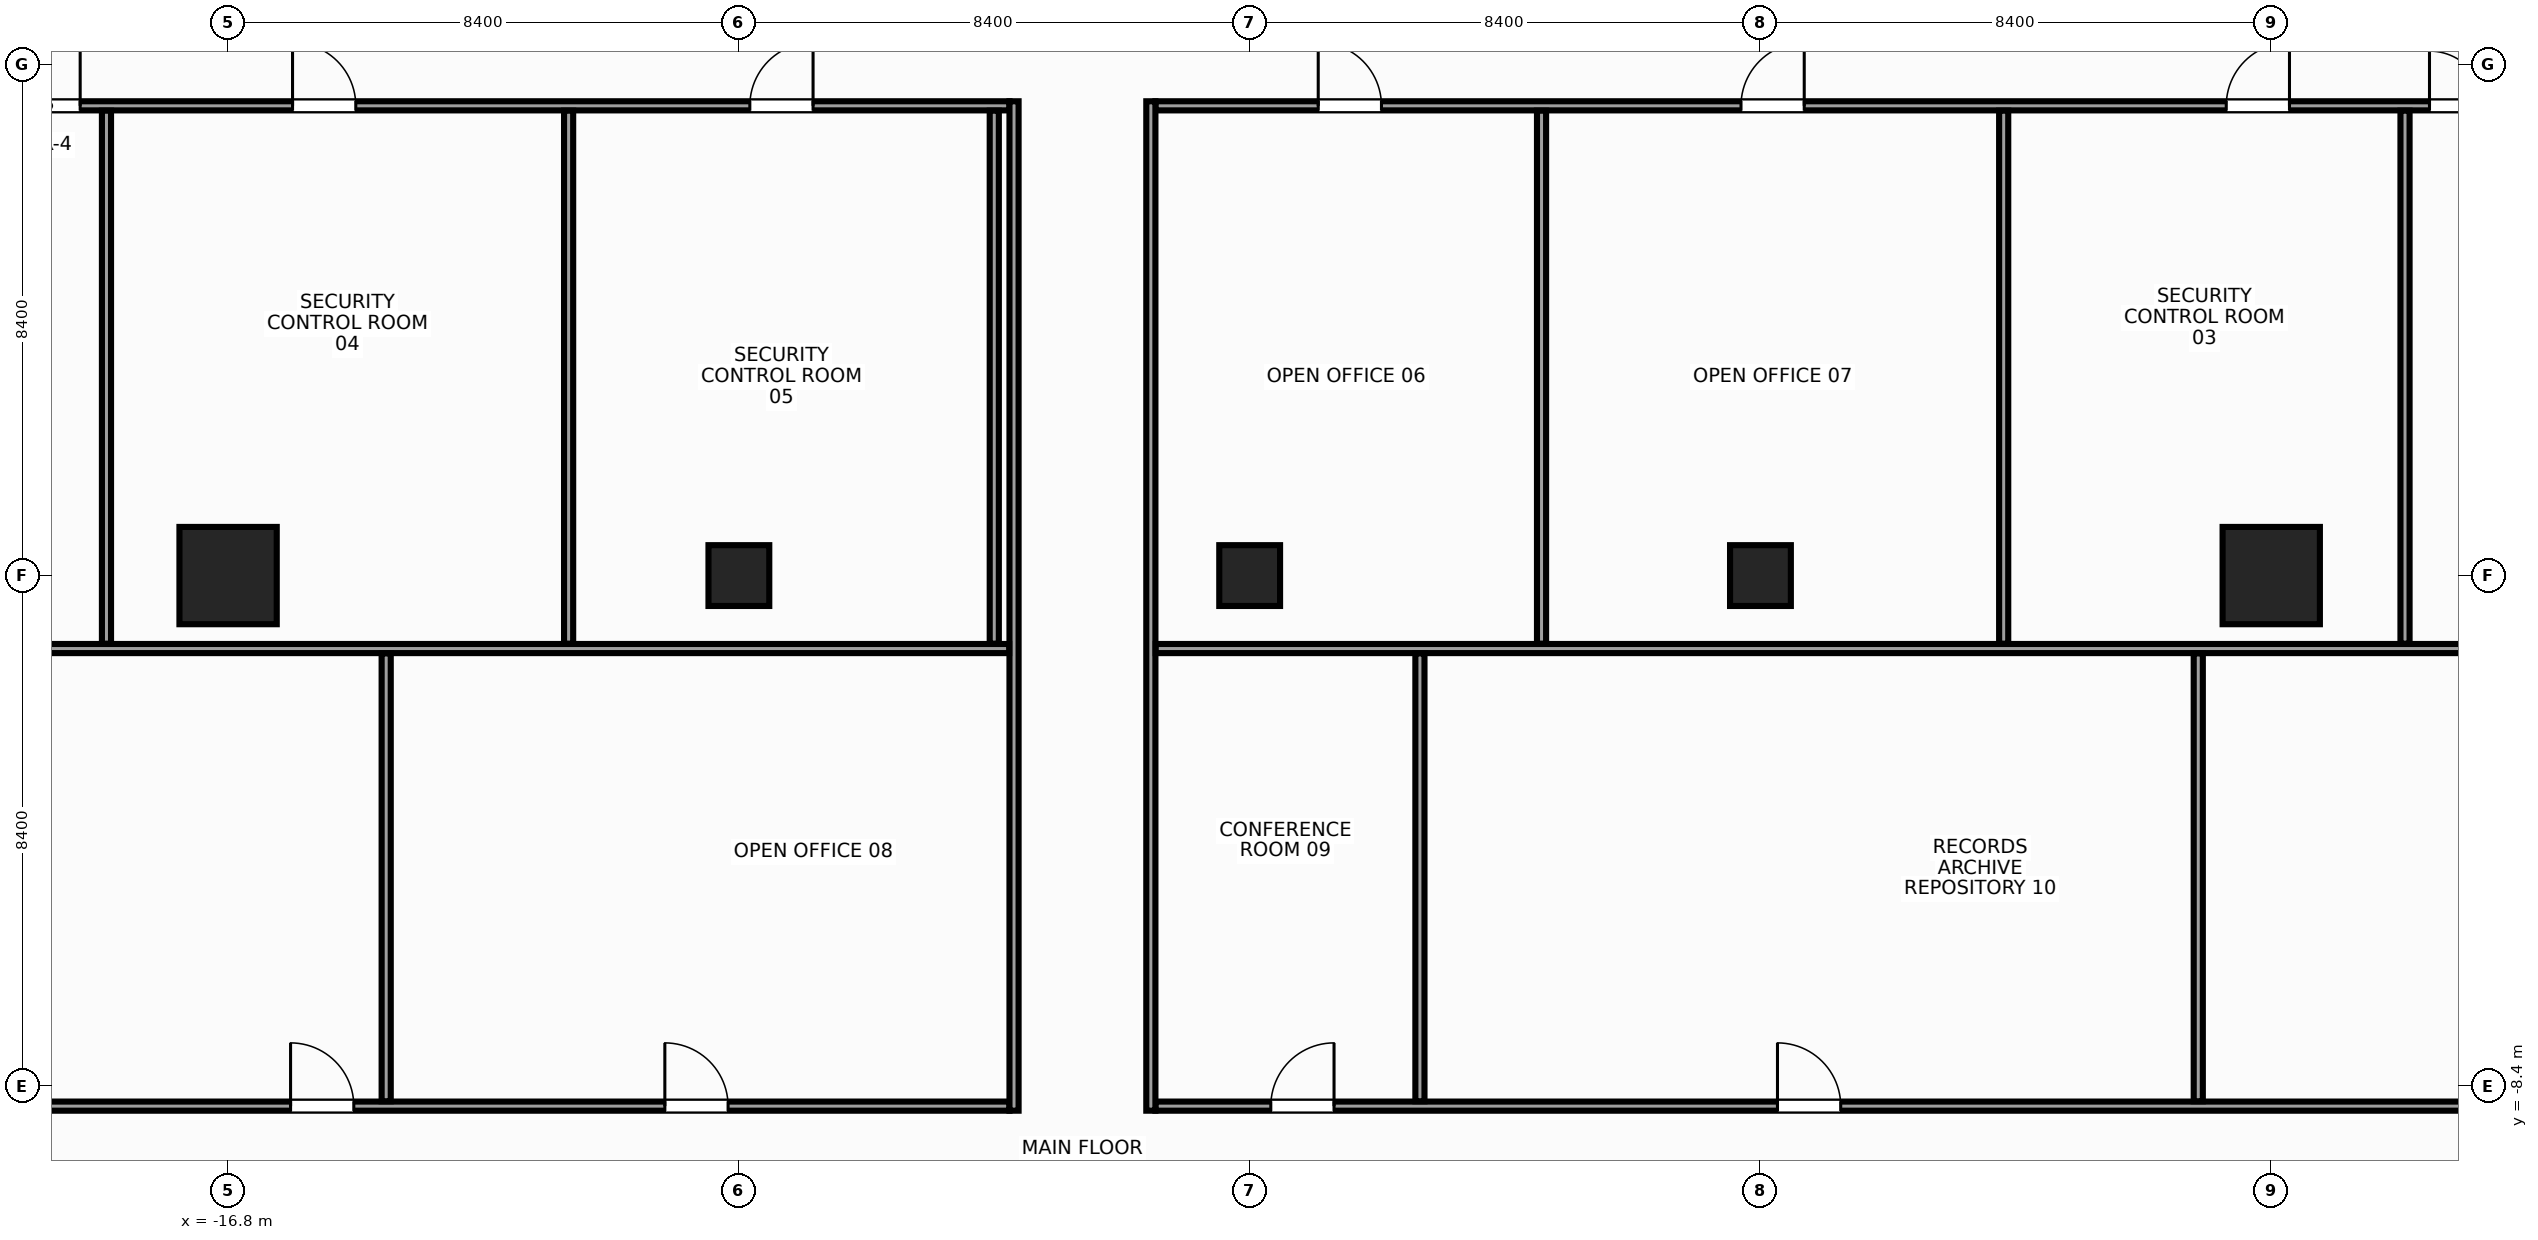
"""IFC4 building model, lengths in metres.
Left out: names, types, materials, properties, quantities, classifications, styles, units other than length and angle.
Written with IfcOpenShell. Run it as: python <this file> out.ifc"""

import sys

from ifc_helpers import new_model, si_unit, direction, frame, frame_2d, origin, origin_with_axes, origin_2d, place, context, subcontext, project, spatial, rectangle, hollow_rectangle, extrude, source, transform, mapped, element, fill, save


model = new_model("IFC4")
c1 = context("Model", 3, precision=1e-05, world=origin(), true_north=direction((0.0, 1.0)))
c2 = subcontext(c1, "Body", "Model", "MODEL_VIEW")
j1 = project(units=[si_unit("LENGTHUNIT", "METRE"), si_unit("PLANEANGLEUNIT", "RADIAN")], contexts=[c1])
p1 = place(None, origin())
s1 = spatial("IfcSite", under=j1, at=p1, CompositionType="ELEMENT")
p2 = place(p1, origin())
s2 = spatial("IfcBuilding", under=s1, at=p2, CompositionType="ELEMENT")
p3 = place(p2, frame((0.0, 0.0, 95.6)))
s3 = spatial("IfcBuildingStorey", under=s2, at=p3, CompositionType="ELEMENT", Elevation=95.6)
m1 = source(origin(), c2, "Body", "SweptSolid", [
    extrude(rectangle(XDim=1.6, YDim=1.6, at=origin_2d()), origin(), (0.0, 0.0, 1.0), 3.6),
])
for number, where, z_axis, x_axis in (
    (1, (-16.8, 0.0, 0.0), (0.0, 0.0, 1.0), (1.0, 0.0, 0.0)),
    (2, (16.8, 0.0, 0.0), (0.0, 0.0, 1.0), (1.0, 0.0, 0.0)),
):
    element("IfcColumn", number, at=place(p3, frame(where, z_axis=z_axis, x_axis=x_axis)), inside=s3, PredefinedType="COLUMN", context=c2, shape_type="MappedRepresentation", body=[
        mapped(m1, transform((0.0, 0.0, 0.0), x_axis=(1.0, 0.0, 0.0), y_axis=(0.0, 1.0, 0.0), z_axis=(0.0, 0.0, 1.0), scale=1.0)),
    ])
m2 = source(origin(), c2, "Body", "SweptSolid", [
    extrude(hollow_rectangle(XDim=1.0, YDim=1.0, WallThickness=0.045, at=origin_2d()), origin(), (0.0, 0.0, 1.0), 3.6),
])
for number, where, z_axis, x_axis in (
    (3, (-8.4, 0.0, 0.0), (0.0, 0.0, 1.0), (1.0, 0.0, 0.0)),
    (4, (8.4, 0.0, 0.0), (0.0, 0.0, 1.0), (1.0, 0.0, 0.0)),
):
    element("IfcColumn", number, at=place(p3, frame(where, z_axis=z_axis, x_axis=x_axis)), inside=s3, PredefinedType="COLUMN", context=c2, shape_type="MappedRepresentation", body=[
        mapped(m2, transform((0.0, 0.0, 0.0), x_axis=(1.0, 0.0, 0.0), y_axis=(0.0, 1.0, 0.0), z_axis=(0.0, 0.0, 1.0), scale=1.0)),
    ])
m3 = source(origin(), c2, "Body", "SweptSolid", [
    extrude(rectangle(XDim=1.0, YDim=1.0, at=origin_2d()), origin(), (0.0, 0.0, 1.0), 3.6),
])
p4 = place(p3, origin_with_axes())
e5 = element("IfcColumn", 5, at=p4, inside=s3, PredefinedType="COLUMN", context=c2, shape_type="MappedRepresentation", body=[
    mapped(m3, transform((0.0, 0.0, 0.0), x_axis=(1.0, 0.0, 0.0), y_axis=(0.0, 1.0, 0.0), z_axis=(0.0, 0.0, 1.0), scale=1.0)),
])
m4 = source(origin(), c2, "Body", "SweptSolid", [
    extrude(rectangle(XDim=16.8, YDim=0.15, at=frame_2d((8.4, 0.0))), origin(), (0.0, 0.0, 1.0), 2.745),
])
p5 = place(p3, frame((-20.75, 7.725, 0.0), z_axis=(0.0, 0.0, 1.0), x_axis=(1.0, 0.0, 0.0)))
e6 = element("IfcWall", 6, at=p5, inside=s3, PredefinedType="PARTITIONING", context=c2, shape_type="MappedRepresentation", body=[
    mapped(m4, transform((0.0, 0.0, 0.0), x_axis=(1.0, 0.0, 0.0), y_axis=(0.0, 1.0, 0.0), z_axis=(0.0, 0.0, 1.0), scale=1.0)),
])
p6 = place(p5, frame((0.478, 0.0, 0.0)))
e7 = element("IfcOpeningElement", 7, at=p6, cuts=e6, PredefinedType="OPENING", context=c2, shape_type="SweptSolid", body=[
    extrude(rectangle(XDim=1.04, YDim=2.2, at=frame_2d((0.52, 1.1))), frame((0.0, 0.087, 0.0), z_axis=(0.0, -1.0, 0.0), x_axis=(1.0, 0.0, 0.0)), (0.0, 0.0, 1.0), 0.174),
])
p7 = place(p5, frame((5.01, 0.0, 0.0)))
e8 = element("IfcOpeningElement", 8, at=p7, cuts=e6, PredefinedType="OPENING", context=c2, shape_type="SweptSolid", body=[
    extrude(rectangle(XDim=1.04, YDim=2.2, at=frame_2d((0.52, 1.1))), frame((0.0, 0.087, 0.0), z_axis=(0.0, -1.0, 0.0), x_axis=(1.0, 0.0, 0.0)), (0.0, 0.0, 1.0), 0.174),
])
p8 = place(p5, frame((12.53, 0.0, 0.0)))
e9 = element("IfcOpeningElement", 9, at=p8, cuts=e6, PredefinedType="OPENING", context=c2, shape_type="SweptSolid", body=[
    extrude(rectangle(XDim=1.04, YDim=2.2, at=frame_2d((0.52, 1.1))), frame((0.0, 0.087, 0.0), z_axis=(0.0, -1.0, 0.0), x_axis=(1.0, 0.0, 0.0)), (0.0, 0.0, 1.0), 0.174),
])
m5 = source(origin(), c2, "Body", "SweptSolid", [
    extrude(rectangle(XDim=22.3, YDim=0.15, at=frame_2d((11.15, 0.0))), origin(), (0.0, 0.0, 1.0), 2.745),
])
p9 = place(p3, frame((-1.55, 7.725, 0.0), z_axis=(0.0, 0.0, 1.0), x_axis=(1.0, 0.0, 0.0)))
e10 = element("IfcWall", 10, at=p9, inside=s3, PredefinedType="PARTITIONING", context=c2, shape_type="MappedRepresentation", body=[
    mapped(m5, transform((0.0, 0.0, 0.0), x_axis=(1.0, 0.0, 0.0), y_axis=(0.0, 1.0, 0.0), z_axis=(0.0, 0.0, 1.0), scale=1.0)),
])
p10 = place(p9, frame((20.952, 0.0, 0.0)))
e11 = element("IfcOpeningElement", 11, at=p10, cuts=e10, PredefinedType="OPENING", context=c2, shape_type="SweptSolid", body=[
    extrude(rectangle(XDim=0.9, YDim=2.15, at=frame_2d((0.45, 1.075))), frame((0.0, 0.087, 0.0), z_axis=(0.0, -1.0, 0.0), x_axis=(1.0, 0.0, 0.0)), (0.0, 0.0, 1.0), 0.174),
])
p11 = place(p9, frame((17.61, 0.0, 0.0)))
e12 = element("IfcOpeningElement", 12, at=p11, cuts=e10, PredefinedType="OPENING", context=c2, shape_type="SweptSolid", body=[
    extrude(rectangle(XDim=1.04, YDim=2.2, at=frame_2d((0.52, 1.1))), frame((0.0, 0.087, 0.0), z_axis=(0.0, -1.0, 0.0), x_axis=(1.0, 0.0, 0.0)), (0.0, 0.0, 1.0), 0.174),
])
p12 = place(p9, frame((2.677, 0.0, 0.0)))
e13 = element("IfcOpeningElement", 13, at=p12, cuts=e10, PredefinedType="OPENING", context=c2, shape_type="SweptSolid", body=[
    extrude(rectangle(XDim=1.04, YDim=2.2, at=frame_2d((0.52, 1.1))), frame((0.0, 0.087, 0.0), z_axis=(0.0, -1.0, 0.0), x_axis=(1.0, 0.0, 0.0)), (0.0, 0.0, 1.0), 0.174),
])
p13 = place(p9, frame((9.63, 0.0, 0.0)))
e14 = element("IfcOpeningElement", 14, at=p13, cuts=e10, PredefinedType="OPENING", context=c2, shape_type="SweptSolid", body=[
    extrude(rectangle(XDim=1.04, YDim=2.2, at=frame_2d((0.52, 1.1))), frame((0.0, 0.087, 0.0), z_axis=(0.0, -1.0, 0.0), x_axis=(1.0, 0.0, 0.0)), (0.0, 0.0, 1.0), 0.174),
])
p14 = place(p3, frame((-20.75, -8.725, 0.0), z_axis=(0.0, 0.0, 1.0), x_axis=(1.0, 0.0, 0.0)))
e15 = element("IfcWall", 15, at=p14, inside=s3, PredefinedType="PARTITIONING", context=c2, shape_type="MappedRepresentation", body=[
    mapped(m4, transform((0.0, 0.0, 0.0), x_axis=(1.0, 0.0, 0.0), y_axis=(0.0, 1.0, 0.0), z_axis=(0.0, 0.0, 1.0), scale=1.0)),
])
p15 = place(p14, frame((11.133, 0.0, 0.0)))
e16 = element("IfcOpeningElement", 16, at=p15, cuts=e15, PredefinedType="OPENING", context=c2, shape_type="SweptSolid", body=[
    extrude(rectangle(XDim=1.04, YDim=2.2, at=frame_2d((0.52, 1.1))), frame((0.0, 0.087, 0.0), z_axis=(0.0, -1.0, 0.0), x_axis=(1.0, 0.0, 0.0)), (0.0, 0.0, 1.0), 0.174),
])
p16 = place(p14, frame((4.978, 0.0, 0.0)))
e17 = element("IfcOpeningElement", 17, at=p16, cuts=e15, PredefinedType="OPENING", context=c2, shape_type="SweptSolid", body=[
    extrude(rectangle(XDim=1.04, YDim=2.2, at=frame_2d((0.52, 1.1))), frame((0.0, 0.087, 0.0), z_axis=(0.0, -1.0, 0.0), x_axis=(1.0, 0.0, 0.0)), (0.0, 0.0, 1.0), 0.174),
])
p17 = place(p3, frame((-1.55, -8.725, 0.0), z_axis=(0.0, 0.0, 1.0), x_axis=(1.0, 0.0, 0.0)))
e18 = element("IfcWall", 18, at=p17, inside=s3, PredefinedType="PARTITIONING", context=c2, shape_type="MappedRepresentation", body=[
    mapped(m5, transform((0.0, 0.0, 0.0), x_axis=(1.0, 0.0, 0.0), y_axis=(0.0, 1.0, 0.0), z_axis=(0.0, 0.0, 1.0), scale=1.0)),
])
p18 = place(p17, frame((1.897, 0.0, 0.0)))
e19 = element("IfcOpeningElement", 19, at=p18, cuts=e18, PredefinedType="OPENING", context=c2, shape_type="SweptSolid", body=[
    extrude(rectangle(XDim=1.04, YDim=2.2, at=frame_2d((0.52, 1.1))), frame((0.0, 0.087, 0.0), z_axis=(0.0, -1.0, 0.0), x_axis=(1.0, 0.0, 0.0)), (0.0, 0.0, 1.0), 0.174),
])
p19 = place(p17, frame((10.23, 0.0, 0.0)))
e20 = element("IfcOpeningElement", 20, at=p19, cuts=e18, PredefinedType="OPENING", context=c2, shape_type="SweptSolid", body=[
    extrude(rectangle(XDim=1.04, YDim=2.2, at=frame_2d((0.52, 1.1))), frame((0.0, 0.087, 0.0), z_axis=(0.0, -1.0, 0.0), x_axis=(1.0, 0.0, 0.0)), (0.0, 0.0, 1.0), 0.174),
])
m6 = source(origin(), c2, "Body", "SweptSolid", [
    extrude(rectangle(XDim=16.6, YDim=0.15, at=frame_2d((8.3, 0.0))), origin(), (0.0, 0.0, 1.0), 2.645),
])
for number, where, z_axis, x_axis in (
    (21, (-3.875, -8.8, 0.0), (0.0, 0.0, 1.0), (0.0, 1.0, 0.0)),
    (22, (-1.625, -8.8, 0.0), (0.0, 0.0, 1.0), (0.0, 1.0, 0.0)),
):
    element("IfcWall", number, at=place(p3, frame(where, z_axis=z_axis, x_axis=x_axis)), inside=s3, PredefinedType="PARTITIONING", context=c2, shape_type="MappedRepresentation", body=[
        mapped(m6, transform((0.0, 0.0, 0.0), x_axis=(1.0, 0.0, 0.0), y_axis=(0.0, 1.0, 0.0), z_axis=(0.0, 0.0, 1.0), scale=1.0)),
    ])
m7 = source(origin(), c2, "Body", "SweptSolid", [
    extrude(rectangle(XDim=21.395, YDim=0.15, at=frame_2d((10.698, 0.0))), origin(), (0.0, 0.0, 1.0), 2.745),
])
p20 = place(p3, frame((-25.35, -1.2, 0.0), z_axis=(0.0, 0.0, 1.0), x_axis=(1.0, 0.0, 0.0)))
e23 = element("IfcWall", 23, at=p20, inside=s3, PredefinedType="PARTITIONING", context=c2, shape_type="MappedRepresentation", body=[
    mapped(m7, transform((0.0, 0.0, 0.0), x_axis=(1.0, 0.0, 0.0), y_axis=(0.0, 1.0, 0.0), z_axis=(0.0, 0.0, 1.0), scale=1.0)),
])
m8 = source(origin(), c2, "Body", "SweptSolid", [
    extrude(rectangle(XDim=26.895, YDim=0.15, at=frame_2d((13.448, 0.0))), origin(), (0.0, 0.0, 1.0), 2.745),
])
p21 = place(p3, frame((-1.545, -1.2, 0.0), z_axis=(0.0, 0.0, 1.0), x_axis=(1.0, 0.0, 0.0)))
e24 = element("IfcWall", 24, at=p21, inside=s3, PredefinedType="PARTITIONING", context=c2, shape_type="MappedRepresentation", body=[
    mapped(m8, transform((0.0, 0.0, 0.0), x_axis=(1.0, 0.0, 0.0), y_axis=(0.0, 1.0, 0.0), z_axis=(0.0, 0.0, 1.0), scale=1.0)),
])
m9 = source(origin(), c2, "Body", "SweptSolid", [
    extrude(rectangle(XDim=8.765, YDim=0.15, at=frame_2d((4.383, 0.0))), origin(), (0.0, 0.0, 1.0), 2.745),
])
p22 = place(p3, frame((-18.8, -1.12, 0.0), z_axis=(0.0, 0.0, 1.0), x_axis=(0.0, 1.0, 0.0)))
e25 = element("IfcWall", 25, at=p22, inside=s3, PredefinedType="PARTITIONING", context=c2, shape_type="MappedRepresentation", body=[
    mapped(m9, transform((0.0, 0.0, 0.0), x_axis=(1.0, 0.0, 0.0), y_axis=(0.0, 1.0, 0.0), z_axis=(0.0, 0.0, 1.0), scale=1.0)),
])
m10 = source(origin(), c2, "Body", "SweptSolid", [
    extrude(rectangle(XDim=8.765, YDim=0.15, at=frame_2d((4.383, 0.0))), origin(), (0.0, 0.0, 1.0), 2.645),
])
for number, where, z_axis, x_axis in (
    (26, (-11.2, -1.12, 0.0), (0.0, 0.0, 1.0), (0.0, 1.0, 0.0)),
    (27, (-4.2, -1.12, 0.0), (0.0, 0.0, 1.0), (0.0, 1.0, 0.0)),
    (28, (4.8, -1.12, 0.0), (0.0, 0.0, 1.0), (0.0, 1.0, 0.0)),
    (29, (12.4, -1.12, 0.0), (0.0, 0.0, 1.0), (0.0, 1.0, 0.0)),
):
    element("IfcWall", number, at=place(p3, frame(where, z_axis=z_axis, x_axis=x_axis)), inside=s3, PredefinedType="PARTITIONING", context=c2, shape_type="MappedRepresentation", body=[
        mapped(m10, transform((0.0, 0.0, 0.0), x_axis=(1.0, 0.0, 0.0), y_axis=(0.0, 1.0, 0.0), z_axis=(0.0, 0.0, 1.0), scale=1.0)),
    ])
p23 = place(p3, frame((19.0, -1.12, 0.0), z_axis=(0.0, 0.0, 1.0), x_axis=(0.0, 1.0, 0.0)))
e30 = element("IfcWall", 30, at=p23, inside=s3, PredefinedType="PARTITIONING", context=c2, shape_type="MappedRepresentation", body=[
    mapped(m9, transform((0.0, 0.0, 0.0), x_axis=(1.0, 0.0, 0.0), y_axis=(0.0, 1.0, 0.0), z_axis=(0.0, 0.0, 1.0), scale=1.0)),
])
m11 = source(origin(), c2, "Body", "SweptSolid", [
    extrude(rectangle(XDim=7.365, YDim=0.15, at=frame_2d((3.683, 0.0))), origin(), (0.0, 0.0, 1.0), 3.36),
])
for number, where, z_axis, x_axis in (
    (31, (-14.2, -8.645, 0.0), (0.0, 0.0, 1.0), (0.0, 1.0, 0.0)),
    (32, (2.8, -8.645, 0.0), (0.0, 0.0, 1.0), (0.0, 1.0, 0.0)),
    (33, (15.6, -8.645, 0.0), (0.0, 0.0, 1.0), (0.0, 1.0, 0.0)),
):
    element("IfcWall", number, at=place(p3, frame(where, z_axis=z_axis, x_axis=x_axis)), inside=s3, PredefinedType="PARTITIONING", context=c2, shape_type="MappedRepresentation", body=[
        mapped(m11, transform((0.0, 0.0, 0.0), x_axis=(1.0, 0.0, 0.0), y_axis=(0.0, 1.0, 0.0), z_axis=(0.0, 0.0, 1.0), scale=1.0)),
    ])
m12 = source(origin(), c2, "Body", "SweptSolid", [
    extrude(rectangle(XDim=1.04, YDim=2.2, at=frame_2d((0.52, 1.1))), frame((0.0, 0.025, 0.0), z_axis=(0.0, -1.0, 0.0), x_axis=(1.0, 0.0, 0.0)), (0.0, 0.0, 1.0), 0.05),
])
p24 = place(p6, origin())
e34 = element("IfcDoor", 34, at=p24, inside=s3, OperationType="SINGLE_SWING_RIGHT", PredefinedType="DOOR", context=c2, shape_type="MappedRepresentation", body=[
    mapped(m12, transform((0.0, 0.0, 0.0), x_axis=(1.0, 0.0, 0.0), y_axis=(0.0, 1.0, 0.0), z_axis=(0.0, 0.0, 1.0), scale=1.0)),
])
fill(e7, e34)
m13 = source(origin(), c2, "Body", "SweptSolid", [
    extrude(rectangle(XDim=0.9, YDim=2.15, at=frame_2d((0.45, 1.075))), frame((0.0, 0.025, 0.0), z_axis=(0.0, -1.0, 0.0), x_axis=(1.0, 0.0, 0.0)), (0.0, 0.0, 1.0), 0.05),
])
p25 = place(p10, origin())
e35 = element("IfcDoor", 35, at=p25, inside=s3, OperationType="SINGLE_SWING_LEFT", PredefinedType="DOOR", context=c2, shape_type="MappedRepresentation", body=[
    mapped(m13, transform((0.0, 0.0, 0.0), x_axis=(1.0, 0.0, 0.0), y_axis=(0.0, 1.0, 0.0), z_axis=(0.0, 0.0, 1.0), scale=1.0)),
])
fill(e11, e35)
p26 = place(p11, origin())
e36 = element("IfcDoor", 36, at=p26, inside=s3, OperationType="SINGLE_SWING_RIGHT", PredefinedType="DOOR", context=c2, shape_type="MappedRepresentation", body=[
    mapped(m12, transform((0.0, 0.0, 0.0), x_axis=(1.0, 0.0, 0.0), y_axis=(0.0, 1.0, 0.0), z_axis=(0.0, 0.0, 1.0), scale=1.0)),
])
fill(e12, e36)
p27 = place(p7, origin())
e37 = element("IfcDoor", 37, at=p27, inside=s3, OperationType="SINGLE_SWING_LEFT", PredefinedType="DOOR", context=c2, shape_type="MappedRepresentation", body=[
    mapped(m12, transform((0.0, 0.0, 0.0), x_axis=(1.0, 0.0, 0.0), y_axis=(0.0, 1.0, 0.0), z_axis=(0.0, 0.0, 1.0), scale=1.0)),
])
fill(e8, e37)
p28 = place(p8, origin())
e38 = element("IfcDoor", 38, at=p28, inside=s3, OperationType="SINGLE_SWING_RIGHT", PredefinedType="DOOR", context=c2, shape_type="MappedRepresentation", body=[
    mapped(m12, transform((0.0, 0.0, 0.0), x_axis=(1.0, 0.0, 0.0), y_axis=(0.0, 1.0, 0.0), z_axis=(0.0, 0.0, 1.0), scale=1.0)),
])
fill(e9, e38)
p29 = place(p12, origin())
e39 = element("IfcDoor", 39, at=p29, inside=s3, OperationType="SINGLE_SWING_LEFT", PredefinedType="DOOR", context=c2, shape_type="MappedRepresentation", body=[
    mapped(m12, transform((0.0, 0.0, 0.0), x_axis=(1.0, 0.0, 0.0), y_axis=(0.0, 1.0, 0.0), z_axis=(0.0, 0.0, 1.0), scale=1.0)),
])
fill(e13, e39)
p30 = place(p13, origin())
e40 = element("IfcDoor", 40, at=p30, inside=s3, OperationType="SINGLE_SWING_RIGHT", PredefinedType="DOOR", context=c2, shape_type="MappedRepresentation", body=[
    mapped(m12, transform((0.0, 0.0, 0.0), x_axis=(1.0, 0.0, 0.0), y_axis=(0.0, 1.0, 0.0), z_axis=(0.0, 0.0, 1.0), scale=1.0)),
])
fill(e14, e40)
p31 = place(p15, origin())
e41 = element("IfcDoor", 41, at=p31, inside=s3, OperationType="SINGLE_SWING_LEFT", PredefinedType="DOOR", context=c2, shape_type="MappedRepresentation", body=[
    mapped(m12, transform((0.0, 0.0, 0.0), x_axis=(1.0, 0.0, 0.0), y_axis=(0.0, 1.0, 0.0), z_axis=(0.0, 0.0, 1.0), scale=1.0)),
])
fill(e16, e41)
p32 = place(p18, origin())
e42 = element("IfcDoor", 42, at=p32, inside=s3, OperationType="SINGLE_SWING_RIGHT", PredefinedType="DOOR", context=c2, shape_type="MappedRepresentation", body=[
    mapped(m12, transform((0.0, 0.0, 0.0), x_axis=(1.0, 0.0, 0.0), y_axis=(0.0, 1.0, 0.0), z_axis=(0.0, 0.0, 1.0), scale=1.0)),
])
fill(e19, e42)
p33 = place(p19, origin())
e43 = element("IfcDoor", 43, at=p33, inside=s3, OperationType="SINGLE_SWING_LEFT", PredefinedType="DOOR", context=c2, shape_type="MappedRepresentation", body=[
    mapped(m12, transform((0.0, 0.0, 0.0), x_axis=(1.0, 0.0, 0.0), y_axis=(0.0, 1.0, 0.0), z_axis=(0.0, 0.0, 1.0), scale=1.0)),
])
fill(e20, e43)
p34 = place(p16, origin())
e44 = element("IfcDoor", 44, at=p34, inside=s3, OperationType="SINGLE_SWING_LEFT", PredefinedType="DOOR", context=c2, shape_type="MappedRepresentation", body=[
    mapped(m12, transform((0.0, 0.0, 0.0), x_axis=(1.0, 0.0, 0.0), y_axis=(0.0, 1.0, 0.0), z_axis=(0.0, 0.0, 1.0), scale=1.0)),
])
fill(e17, e44)
save(model, sys.argv[1])
